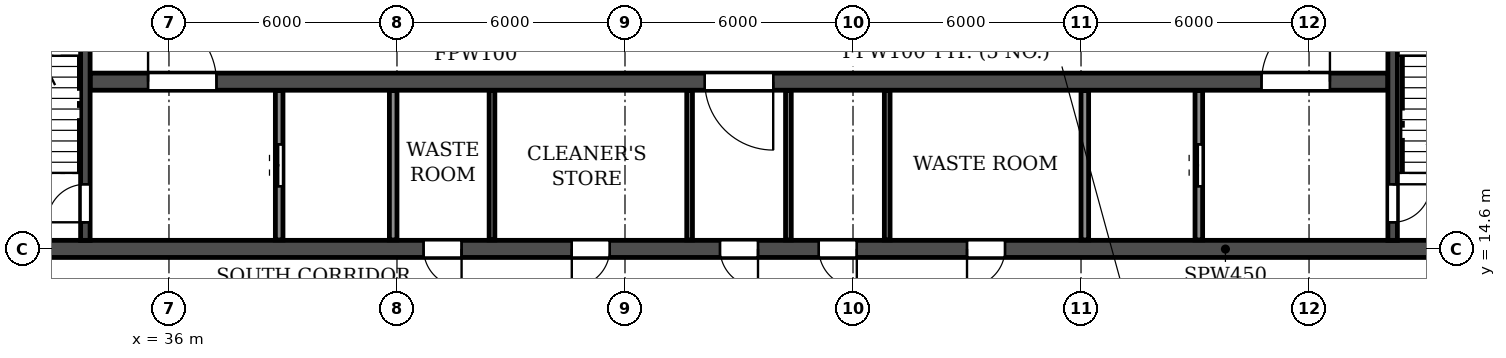
"""IFC4 building model, lengths in metres.
Left out: names, types, materials, properties, quantities, classifications, styles, units other than length and angle.
Written with IfcOpenShell. Run it as: python <this file> out.ifc"""

import sys

from ifc_helpers import new_model, si_unit, direction, frame, frame_2d, origin, place, context, subcontext, project, spatial, rectangle, extrude, element, fill, save


model = new_model("IFC4")
c1 = context("Model", 3, precision=1e-05, world=origin(), true_north=direction((0.0, 1.0)))
c2 = subcontext(c1, "Body", "Model", "MODEL_VIEW")
j1 = project(units=[si_unit("LENGTHUNIT", "METRE"), si_unit("PLANEANGLEUNIT", "RADIAN")], contexts=[c1])
p1 = place(None, origin())
s1 = spatial("IfcSite", under=j1, at=p1, CompositionType="ELEMENT")
p2 = place(p1, origin())
s2 = spatial("IfcBuilding", under=s1, at=p2, CompositionType="ELEMENT")
p3 = place(p2, frame((0.0, 0.0, 125.7)))
s3 = spatial("IfcBuildingStorey", under=s2, at=p3, CompositionType="ELEMENT", Elevation=125.7)
p4 = place(p3, frame((12.2, 14.6, 0.0), z_axis=(0.0, 0.0, 1.0), x_axis=(1.0, 0.0, 0.0)))
e1 = element("IfcWall", 1, at=p4, inside=s3, PredefinedType="SOLIDWALL", context=c2, shape_type="SweptSolid", body=[
    extrude(rectangle(XDim=77.6, YDim=0.45, at=frame_2d((38.8, 0.0))), origin(), (0.0, 0.0, 1.0), 3.07),
])
p5 = place(p4, frame((0.8, 0.0, 0.0)))
e2 = element("IfcOpeningElement", 2, at=p5, cuts=e1, PredefinedType="OPENING", context=c2, shape_type="SweptSolid", body=[
    extrude(rectangle(XDim=1.0, YDim=2.1, at=frame_2d((0.5, 1.05))), frame((0.0, 0.235, 0.0), z_axis=(0.0, -1.0, 0.0), x_axis=(1.0, 0.0, 0.0)), (0.0, 0.0, 1.0), 0.47),
])
p6 = place(p4, frame((3.8, 0.0, 0.0)))
e3 = element("IfcOpeningElement", 3, at=p6, cuts=e1, PredefinedType="OPENING", context=c2, shape_type="SweptSolid", body=[
    extrude(rectangle(XDim=1.0, YDim=2.1, at=frame_2d((0.5, 1.05))), frame((0.0, 0.235, 0.0), z_axis=(0.0, -1.0, 0.0), x_axis=(1.0, 0.0, 0.0)), (0.0, 0.0, 1.0), 0.47),
])
p7 = place(p4, frame((6.7, 0.0, 0.0)))
e4 = element("IfcOpeningElement", 4, at=p7, cuts=e1, PredefinedType="OPENING", context=c2, shape_type="SweptSolid", body=[
    extrude(rectangle(XDim=1.0, YDim=2.1, at=frame_2d((0.5, 1.05))), frame((0.0, 0.235, 0.0), z_axis=(0.0, -1.0, 0.0), x_axis=(1.0, 0.0, 0.0)), (0.0, 0.0, 1.0), 0.47),
])
p8 = place(p4, frame((14.6, 0.0, 0.0)))
e5 = element("IfcOpeningElement", 5, at=p8, cuts=e1, PredefinedType="OPENING", context=c2, shape_type="SweptSolid", body=[
    extrude(rectangle(XDim=1.0, YDim=2.1, at=frame_2d((0.5, 1.05))), frame((0.0, 0.235, 0.0), z_axis=(0.0, -1.0, 0.0), x_axis=(1.0, 0.0, 0.0)), (0.0, 0.0, 1.0), 0.47),
])
p9 = place(p4, frame((19.2, 0.0, 0.0)))
e6 = element("IfcOpeningElement", 6, at=p9, cuts=e1, PredefinedType="OPENING", context=c2, shape_type="SweptSolid", body=[
    extrude(rectangle(XDim=1.0, YDim=2.1, at=frame_2d((0.5, 1.05))), frame((0.0, 0.235, 0.0), z_axis=(0.0, -1.0, 0.0), x_axis=(1.0, 0.0, 0.0)), (0.0, 0.0, 1.0), 0.47),
])
p10 = place(p4, frame((30.5, 0.0, 0.0)))
e7 = element("IfcOpeningElement", 7, at=p10, cuts=e1, PredefinedType="OPENING", context=c2, shape_type="SweptSolid", body=[
    extrude(rectangle(XDim=1.0, YDim=2.1, at=frame_2d((0.5, 1.05))), frame((0.0, 0.235, 0.0), z_axis=(0.0, -1.0, 0.0), x_axis=(1.0, 0.0, 0.0)), (0.0, 0.0, 1.0), 0.47),
])
p11 = place(p4, frame((34.4, 0.0, 0.0)))
e8 = element("IfcOpeningElement", 8, at=p11, cuts=e1, PredefinedType="OPENING", context=c2, shape_type="SweptSolid", body=[
    extrude(rectangle(XDim=1.0, YDim=2.1, at=frame_2d((0.5, 1.05))), frame((0.0, 0.235, 0.0), z_axis=(0.0, -1.0, 0.0), x_axis=(1.0, 0.0, 0.0)), (0.0, 0.0, 1.0), 0.47),
])
p12 = place(p4, frame((38.3, 0.0, 0.0)))
e9 = element("IfcOpeningElement", 9, at=p12, cuts=e1, PredefinedType="OPENING", context=c2, shape_type="SweptSolid", body=[
    extrude(rectangle(XDim=1.0, YDim=2.1, at=frame_2d((0.5, 1.05))), frame((0.0, 0.235, 0.0), z_axis=(0.0, -1.0, 0.0), x_axis=(1.0, 0.0, 0.0)), (0.0, 0.0, 1.0), 0.47),
])
p13 = place(p4, frame((40.9, 0.0, 0.0)))
e10 = element("IfcOpeningElement", 10, at=p13, cuts=e1, PredefinedType="OPENING", context=c2, shape_type="SweptSolid", body=[
    extrude(rectangle(XDim=1.0, YDim=2.1, at=frame_2d((0.5, 1.05))), frame((0.0, 0.235, 0.0), z_axis=(0.0, -1.0, 0.0), x_axis=(1.0, 0.0, 0.0)), (0.0, 0.0, 1.0), 0.47),
])
p14 = place(p4, frame((44.8, 0.0, 0.0)))
e11 = element("IfcOpeningElement", 11, at=p14, cuts=e1, PredefinedType="OPENING", context=c2, shape_type="SweptSolid", body=[
    extrude(rectangle(XDim=1.0, YDim=2.1, at=frame_2d((0.5, 1.05))), frame((0.0, 0.235, 0.0), z_axis=(0.0, -1.0, 0.0), x_axis=(1.0, 0.0, 0.0)), (0.0, 0.0, 1.0), 0.47),
])
p15 = place(p4, frame((57.4, 0.0, 0.0)))
e12 = element("IfcOpeningElement", 12, at=p15, cuts=e1, PredefinedType="OPENING", context=c2, shape_type="SweptSolid", body=[
    extrude(rectangle(XDim=1.0, YDim=2.1, at=frame_2d((0.5, 1.05))), frame((0.0, 0.235, 0.0), z_axis=(0.0, -1.0, 0.0), x_axis=(1.0, 0.0, 0.0)), (0.0, 0.0, 1.0), 0.47),
])
p16 = place(p4, frame((62.0, 0.0, 0.0)))
e13 = element("IfcOpeningElement", 13, at=p16, cuts=e1, PredefinedType="OPENING", context=c2, shape_type="SweptSolid", body=[
    extrude(rectangle(XDim=1.0, YDim=2.1, at=frame_2d((0.5, 1.05))), frame((0.0, 0.235, 0.0), z_axis=(0.0, -1.0, 0.0), x_axis=(1.0, 0.0, 0.0)), (0.0, 0.0, 1.0), 0.47),
])
p17 = place(p4, frame((69.9, 0.0, 0.0)))
e14 = element("IfcOpeningElement", 14, at=p17, cuts=e1, PredefinedType="OPENING", context=c2, shape_type="SweptSolid", body=[
    extrude(rectangle(XDim=1.0, YDim=2.1, at=frame_2d((0.5, 1.05))), frame((0.0, 0.235, 0.0), z_axis=(0.0, -1.0, 0.0), x_axis=(1.0, 0.0, 0.0)), (0.0, 0.0, 1.0), 0.47),
])
p18 = place(p4, frame((72.8, 0.0, 0.0)))
e15 = element("IfcOpeningElement", 15, at=p18, cuts=e1, PredefinedType="OPENING", context=c2, shape_type="SweptSolid", body=[
    extrude(rectangle(XDim=1.0, YDim=2.1, at=frame_2d((0.5, 1.05))), frame((0.0, 0.235, 0.0), z_axis=(0.0, -1.0, 0.0), x_axis=(1.0, 0.0, 0.0)), (0.0, 0.0, 1.0), 0.47),
])
p19 = place(p4, frame((75.8, 0.0, 0.0)))
e16 = element("IfcOpeningElement", 16, at=p19, cuts=e1, PredefinedType="OPENING", context=c2, shape_type="SweptSolid", body=[
    extrude(rectangle(XDim=1.0, YDim=2.1, at=frame_2d((0.5, 1.05))), frame((0.0, 0.235, 0.0), z_axis=(0.0, -1.0, 0.0), x_axis=(1.0, 0.0, 0.0)), (0.0, 0.0, 1.0), 0.47),
])
p20 = place(p3, frame((33.925, 19.0, 0.0), z_axis=(0.0, 0.0, 1.0), x_axis=(1.0, 0.0, 0.0)))
e17 = element("IfcWall", 17, at=p20, inside=s3, PredefinedType="SOLIDWALL", context=c2, shape_type="SweptSolid", body=[
    extrude(rectangle(XDim=34.15, YDim=0.45, at=frame_2d((17.075, 0.0))), origin(), (0.0, 0.0, 1.0), 3.07),
])
p21 = place(p20, frame((16.175, 0.0, 0.0)))
e18 = element("IfcOpeningElement", 18, at=p21, cuts=e17, PredefinedType="OPENING", context=c2, shape_type="SweptSolid", body=[
    extrude(rectangle(XDim=1.8, YDim=2.1, at=frame_2d((0.9, 1.05))), frame((0.0, 0.235, 0.0), z_axis=(0.0, -1.0, 0.0), x_axis=(1.0, 0.0, 0.0)), (0.0, 0.0, 1.0), 0.47),
])
p22 = place(p20, frame((1.525, 0.0, 0.0)))
e19 = element("IfcOpeningElement", 19, at=p22, cuts=e17, PredefinedType="OPENING", context=c2, shape_type="SweptSolid", body=[
    extrude(rectangle(XDim=1.8, YDim=2.1, at=frame_2d((0.9, 1.05))), frame((0.0, 0.235, 0.0), z_axis=(0.0, -1.0, 0.0), x_axis=(1.0, 0.0, 0.0)), (0.0, 0.0, 1.0), 0.47),
])
p23 = place(p20, frame((30.825, 0.0, 0.0)))
e20 = element("IfcOpeningElement", 20, at=p23, cuts=e17, PredefinedType="OPENING", context=c2, shape_type="SweptSolid", body=[
    extrude(rectangle(XDim=1.8, YDim=2.1, at=frame_2d((0.9, 1.05))), frame((0.0, 0.235, 0.0), z_axis=(0.0, -1.0, 0.0), x_axis=(1.0, 0.0, 0.0)), (0.0, 0.0, 1.0), 0.47),
])
p24 = place(p3, frame((33.8, 14.825, 0.0), z_axis=(0.0, 0.0, 1.0), x_axis=(0.0, 1.0, 0.0)))
e21 = element("IfcWall", 21, at=p24, inside=s3, PredefinedType="SOLIDWALL", context=c2, shape_type="SweptSolid", body=[
    extrude(rectangle(XDim=7.65, YDim=0.25, at=frame_2d((3.825, 0.0))), origin(), (0.0, 0.0, 1.0), 3.07),
])
p25 = place(p24, frame((0.475, 0.0, 0.0)))
e22 = element("IfcOpeningElement", 22, at=p25, cuts=e21, PredefinedType="OPENING", context=c2, shape_type="SweptSolid", body=[
    extrude(rectangle(XDim=1.0, YDim=2.1, at=frame_2d((0.5, 1.05))), frame((0.0, 0.135, 0.0), z_axis=(0.0, -1.0, 0.0), x_axis=(1.0, 0.0, 0.0)), (0.0, 0.0, 1.0), 0.27),
])
p26 = place(p3, frame((68.2, 14.825, 0.0), z_axis=(0.0, 0.0, 1.0), x_axis=(0.0, 1.0, 0.0)))
e23 = element("IfcWall", 23, at=p26, inside=s3, PredefinedType="SOLIDWALL", context=c2, shape_type="SweptSolid", body=[
    extrude(rectangle(XDim=7.65, YDim=0.25, at=frame_2d((3.825, 0.0))), origin(), (0.0, 0.0, 1.0), 3.07),
])
p27 = place(p26, frame((0.475, 0.0, 0.0)))
e24 = element("IfcOpeningElement", 24, at=p27, cuts=e23, PredefinedType="OPENING", context=c2, shape_type="SweptSolid", body=[
    extrude(rectangle(XDim=1.0, YDim=2.1, at=frame_2d((0.5, 1.05))), frame((0.0, 0.135, 0.0), z_axis=(0.0, -1.0, 0.0), x_axis=(1.0, 0.0, 0.0)), (0.0, 0.0, 1.0), 0.27),
])
for number, where, z_axis, x_axis in (
    (25, (49.7, 14.835, 0.0), (0.0, 0.0, 1.0), (0.0, 1.0, 0.0)),
    (26, (52.3, 14.835, 0.0), (0.0, 0.0, 1.0), (0.0, 1.0, 0.0)),
    (27, (44.5, 14.835, 0.0), (0.0, 0.0, 1.0), (0.0, 1.0, 0.0)),
    (28, (54.9, 14.835, 0.0), (0.0, 0.0, 1.0), (0.0, 1.0, 0.0)),
):
    element("IfcWall", number, at=place(p3, frame(where, z_axis=z_axis, x_axis=x_axis)), inside=s3, PredefinedType="PARTITIONING", context=c2, shape_type="SweptSolid", body=[
        extrude(rectangle(XDim=3.93, YDim=0.15, at=frame_2d((1.965, 0.0))), origin(), (0.0, 0.0, 1.0), 3.07),
    ])
p28 = place(p3, frame((38.9, 14.835, 0.0), z_axis=(0.0, 0.0, 1.0), x_axis=(0.0, 1.0, 0.0)))
e29 = element("IfcWall", 29, at=p28, inside=s3, PredefinedType="PARTITIONING", context=c2, shape_type="SweptSolid", body=[
    extrude(rectangle(XDim=3.93, YDim=0.2, at=frame_2d((1.965, 0.0))), origin(), (0.0, 0.0, 1.0), 3.07),
])
p29 = place(p28, frame((1.415, 0.0, 0.0)))
e30 = element("IfcOpeningElement", 30, at=p29, cuts=e29, PredefinedType="OPENING", context=c2, shape_type="SweptSolid", body=[
    extrude(rectangle(XDim=1.1, YDim=2.1, at=frame_2d((0.55, 1.05))), frame((0.0, 0.11, 0.0), z_axis=(0.0, -1.0, 0.0), x_axis=(1.0, 0.0, 0.0)), (0.0, 0.0, 1.0), 0.22),
])
for number, where, z_axis, x_axis in (
    (31, (41.9, 14.835, 0.0), (0.0, 0.0, 1.0), (0.0, 1.0, 0.0)),
    (32, (60.1, 14.835, 0.0), (0.0, 0.0, 1.0), (0.0, 1.0, 0.0)),
):
    element("IfcWall", number, at=place(p3, frame(where, z_axis=z_axis, x_axis=x_axis)), inside=s3, PredefinedType="PARTITIONING", context=c2, shape_type="SweptSolid", body=[
        extrude(rectangle(XDim=3.93, YDim=0.2, at=frame_2d((1.965, 0.0))), origin(), (0.0, 0.0, 1.0), 3.07),
    ])
p30 = place(p3, frame((63.1, 14.835, 0.0), z_axis=(0.0, 0.0, 1.0), x_axis=(0.0, 1.0, 0.0)))
e33 = element("IfcWall", 33, at=p30, inside=s3, PredefinedType="PARTITIONING", context=c2, shape_type="SweptSolid", body=[
    extrude(rectangle(XDim=3.93, YDim=0.2, at=frame_2d((1.965, 0.0))), origin(), (0.0, 0.0, 1.0), 3.07),
])
p31 = place(p30, frame((1.415, 0.0, 0.0)))
e34 = element("IfcOpeningElement", 34, at=p31, cuts=e33, PredefinedType="OPENING", context=c2, shape_type="SweptSolid", body=[
    extrude(rectangle(XDim=1.1, YDim=2.1, at=frame_2d((0.55, 1.05))), frame((0.0, 0.11, 0.0), z_axis=(0.0, -1.0, 0.0), x_axis=(1.0, 0.0, 0.0)), (0.0, 0.0, 1.0), 0.22),
])
p32 = place(p10, frame((1.0, 0.0, 0.0), z_axis=(0.0, 0.0, 1.0), x_axis=(-1.0, 0.0, 0.0)))
e35 = element("IfcDoor", 35, at=p32, inside=s3, OperationType="SINGLE_SWING_LEFT", PredefinedType="DOOR", context=c2, shape_type="SweptSolid", body=[
    extrude(rectangle(XDim=1.0, YDim=2.1, at=frame_2d((0.5, 1.05))), frame((0.0, 0.025, 0.0), z_axis=(0.0, -1.0, 0.0), x_axis=(1.0, 0.0, 0.0)), (0.0, 0.0, 1.0), 0.05),
])
fill(e7, e35)
p33 = place(p11, frame((1.0, 0.0, 0.0), z_axis=(0.0, 0.0, 1.0), x_axis=(-1.0, 0.0, 0.0)))
e36 = element("IfcDoor", 36, at=p33, inside=s3, OperationType="SINGLE_SWING_RIGHT", PredefinedType="DOOR", context=c2, shape_type="SweptSolid", body=[
    extrude(rectangle(XDim=1.0, YDim=2.1, at=frame_2d((0.5, 1.05))), frame((0.0, 0.025, 0.0), z_axis=(0.0, -1.0, 0.0), x_axis=(1.0, 0.0, 0.0)), (0.0, 0.0, 1.0), 0.05),
])
fill(e8, e36)
p34 = place(p12, frame((1.0, 0.0, 0.0), z_axis=(0.0, 0.0, 1.0), x_axis=(-1.0, 0.0, 0.0)))
e37 = element("IfcDoor", 37, at=p34, inside=s3, OperationType="SINGLE_SWING_LEFT", PredefinedType="DOOR", context=c2, shape_type="SweptSolid", body=[
    extrude(rectangle(XDim=1.0, YDim=2.1, at=frame_2d((0.5, 1.05))), frame((0.0, 0.025, 0.0), z_axis=(0.0, -1.0, 0.0), x_axis=(1.0, 0.0, 0.0)), (0.0, 0.0, 1.0), 0.05),
])
fill(e9, e37)
p35 = place(p13, frame((1.0, 0.0, 0.0), z_axis=(0.0, 0.0, 1.0), x_axis=(-1.0, 0.0, 0.0)))
e38 = element("IfcDoor", 38, at=p35, inside=s3, OperationType="SINGLE_SWING_LEFT", PredefinedType="DOOR", context=c2, shape_type="SweptSolid", body=[
    extrude(rectangle(XDim=1.0, YDim=2.1, at=frame_2d((0.5, 1.05))), frame((0.0, 0.025, 0.0), z_axis=(0.0, -1.0, 0.0), x_axis=(1.0, 0.0, 0.0)), (0.0, 0.0, 1.0), 0.05),
])
fill(e10, e38)
p36 = place(p14, frame((1.0, 0.0, 0.0), z_axis=(0.0, 0.0, 1.0), x_axis=(-1.0, 0.0, 0.0)))
e39 = element("IfcDoor", 39, at=p36, inside=s3, OperationType="SINGLE_SWING_RIGHT", PredefinedType="DOOR", context=c2, shape_type="SweptSolid", body=[
    extrude(rectangle(XDim=1.0, YDim=2.1, at=frame_2d((0.5, 1.05))), frame((0.0, 0.025, 0.0), z_axis=(0.0, -1.0, 0.0), x_axis=(1.0, 0.0, 0.0)), (0.0, 0.0, 1.0), 0.05),
])
fill(e11, e39)
p37 = place(p31, origin())
e40 = element("IfcDoor", 40, at=p37, inside=s3, OperationType="DOUBLE_DOOR_SLIDING", PredefinedType="DOOR", context=c2, shape_type="SweptSolid", body=[
    extrude(rectangle(XDim=1.1, YDim=2.1, at=frame_2d((0.55, 1.05))), frame((0.0, 0.025, 0.0), z_axis=(0.0, -1.0, 0.0), x_axis=(1.0, 0.0, 0.0)), (0.0, 0.0, 1.0), 0.05),
])
fill(e34, e40)
p38 = place(p27, frame((1.0, 0.0, 0.0), z_axis=(0.0, 0.0, 1.0), x_axis=(-1.0, 0.0, 0.0)))
e41 = element("IfcDoor", 41, at=p38, inside=s3, OperationType="SINGLE_SWING_LEFT", PredefinedType="DOOR", context=c2, shape_type="SweptSolid", body=[
    extrude(rectangle(XDim=1.0, YDim=2.1, at=frame_2d((0.5, 1.05))), frame((0.0, 0.025, 0.0), z_axis=(0.0, -1.0, 0.0), x_axis=(1.0, 0.0, 0.0)), (0.0, 0.0, 1.0), 0.05),
])
fill(e24, e41)
p39 = place(p25, origin())
e42 = element("IfcDoor", 42, at=p39, inside=s3, OperationType="SINGLE_SWING_LEFT", PredefinedType="DOOR", context=c2, shape_type="SweptSolid", body=[
    extrude(rectangle(XDim=1.0, YDim=2.1, at=frame_2d((0.5, 1.05))), frame((0.0, 0.025, 0.0), z_axis=(0.0, -1.0, 0.0), x_axis=(1.0, 0.0, 0.0)), (0.0, 0.0, 1.0), 0.05),
])
fill(e22, e42)
p40 = place(p29, origin())
e43 = element("IfcDoor", 43, at=p40, inside=s3, OperationType="DOUBLE_DOOR_SLIDING", PredefinedType="DOOR", context=c2, shape_type="SweptSolid", body=[
    extrude(rectangle(XDim=1.1, YDim=2.1, at=frame_2d((0.55, 1.05))), frame((0.0, 0.025, 0.0), z_axis=(0.0, -1.0, 0.0), x_axis=(1.0, 0.0, 0.0)), (0.0, 0.0, 1.0), 0.05),
])
fill(e30, e43)
p41 = place(p21, frame((1.8, 0.0, 0.0), z_axis=(0.0, 0.0, 1.0), x_axis=(-1.0, 0.0, 0.0)))
e44 = element("IfcDoor", 44, at=p41, inside=s3, OperationType="DOUBLE_DOOR_SINGLE_SWING", PredefinedType="DOOR", context=c2, shape_type="SweptSolid", body=[
    extrude(rectangle(XDim=1.8, YDim=2.1, at=frame_2d((0.9, 1.05))), frame((0.0, 0.025, 0.0), z_axis=(0.0, -1.0, 0.0), x_axis=(1.0, 0.0, 0.0)), (0.0, 0.0, 1.0), 0.05),
])
fill(e18, e44)
p42 = place(p22, origin())
e45 = element("IfcDoor", 45, at=p42, inside=s3, OperationType="DOUBLE_DOOR_SINGLE_SWING", PredefinedType="DOOR", context=c2, shape_type="SweptSolid", body=[
    extrude(rectangle(XDim=1.8, YDim=2.1, at=frame_2d((0.9, 1.05))), frame((0.0, 0.025, 0.0), z_axis=(0.0, -1.0, 0.0), x_axis=(1.0, 0.0, 0.0)), (0.0, 0.0, 1.0), 0.05),
])
fill(e19, e45)
p43 = place(p23, origin())
e46 = element("IfcDoor", 46, at=p43, inside=s3, OperationType="DOUBLE_DOOR_SINGLE_SWING", PredefinedType="DOOR", context=c2, shape_type="SweptSolid", body=[
    extrude(rectangle(XDim=1.8, YDim=2.1, at=frame_2d((0.9, 1.05))), frame((0.0, 0.025, 0.0), z_axis=(0.0, -1.0, 0.0), x_axis=(1.0, 0.0, 0.0)), (0.0, 0.0, 1.0), 0.05),
])
fill(e20, e46)
save(model, sys.argv[1])
